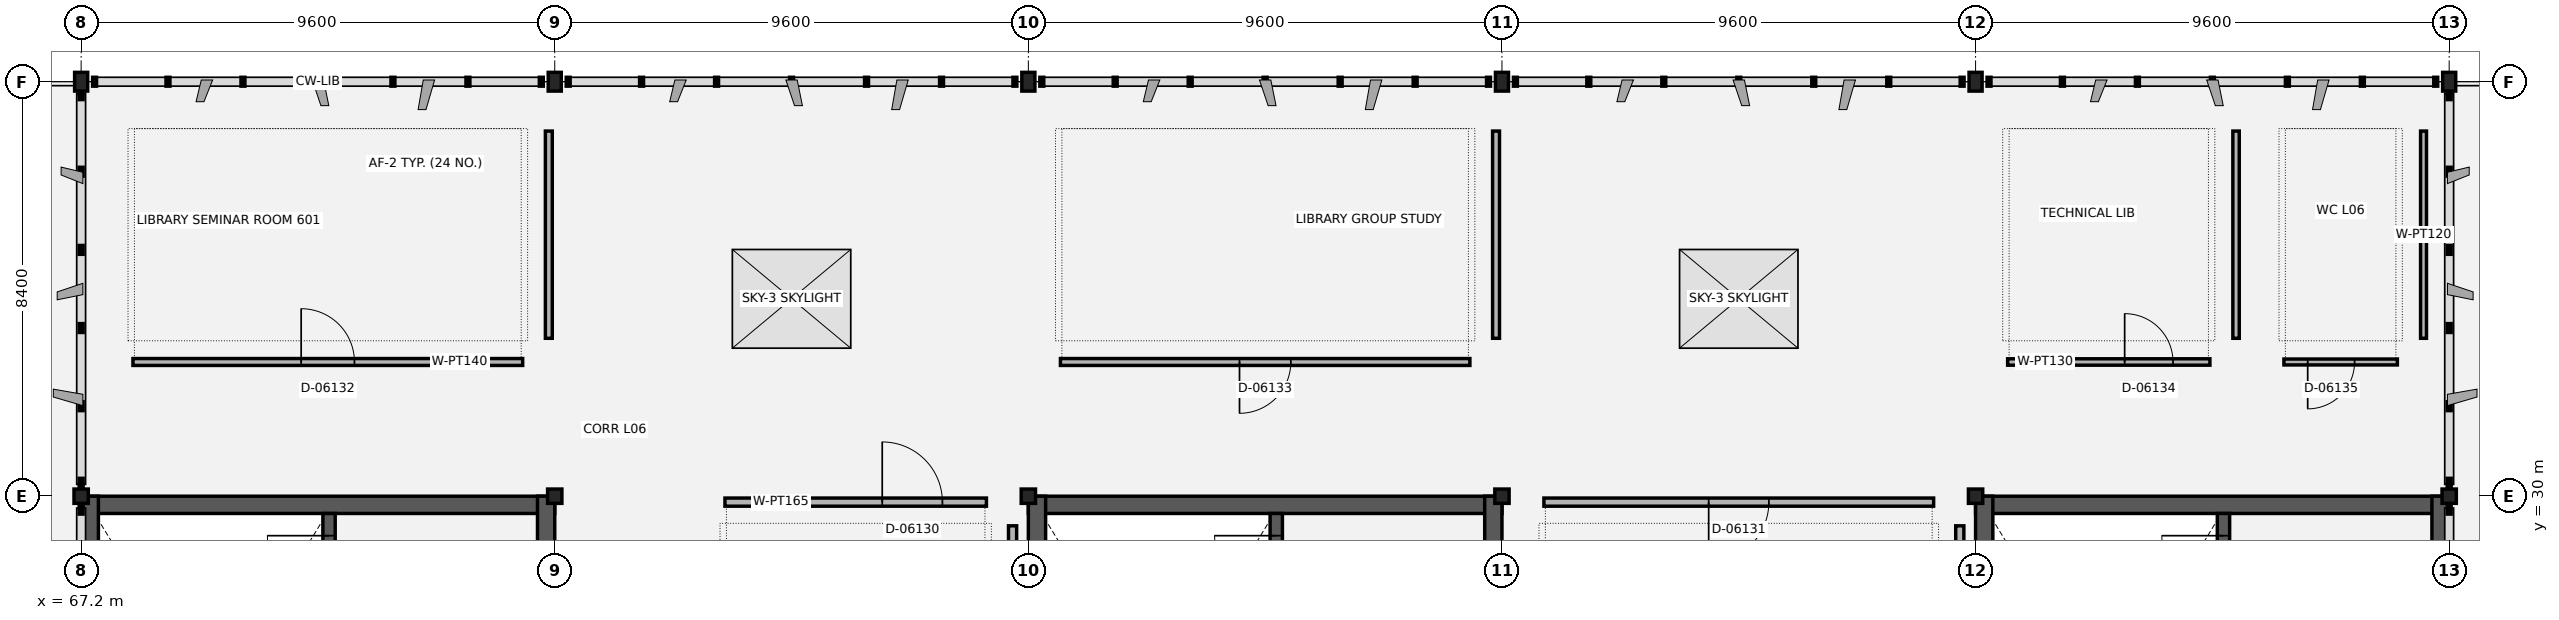
"""IFC4 building model, lengths in metres.
Left out: names, types, materials, properties, quantities, classifications, styles, units other than length and angle.
Written with IfcOpenShell. Run it as: python <this file> out.ifc"""

import sys

from ifc_helpers import new_model, si_unit, direction, frame, frame_2d, origin, origin_2d, place, context, subcontext, project, spatial, rectangle, extrude, element, fill, save


model = new_model("IFC4")
c1 = context("Model", 3, precision=1e-05, world=origin(), true_north=direction((0.0, 1.0)))
c2 = subcontext(c1, "Body", "Model", "MODEL_VIEW")
j1 = project(units=[si_unit("LENGTHUNIT", "METRE"), si_unit("PLANEANGLEUNIT", "RADIAN")], contexts=[c1])
p1 = place(None, origin())
s1 = spatial("IfcSite", under=j1, at=p1, CompositionType="ELEMENT")
p2 = place(p1, origin())
s2 = spatial("IfcBuilding", under=s1, at=p2, CompositionType="ELEMENT")
p3 = place(p2, frame((0.0, 0.0, 27.0)))
s3 = spatial("IfcBuildingStorey", under=s2, at=p3, CompositionType="ELEMENT", Elevation=27.0)
p4 = place(p3, frame((67.2, 30.0, 0.0), z_axis=(0.0, 0.0, 1.0), x_axis=(1.0, 0.0, 0.0)))
e1 = element("IfcColumn", 1, at=p4, inside=s3, PredefinedType="COLUMN", context=c2, shape_type="SweptSolid", body=[
    extrude(rectangle(XDim=0.29, YDim=0.29, at=origin_2d()), origin(), (0.0, 0.0, 1.0), 4.8),
])
p5 = place(p3, frame((67.2, 38.4, 0.0), z_axis=(0.0, 0.0, 1.0), x_axis=(1.0, 0.0, 0.0)))
e2 = element("IfcColumn", 2, at=p5, inside=s3, PredefinedType="COLUMN", context=c2, shape_type="SweptSolid", body=[
    extrude(rectangle(XDim=0.265, YDim=0.38, at=origin_2d()), origin(), (0.0, 0.0, 1.0), 4.8),
])
p6 = place(p3, frame((76.8, 30.0, 0.0), z_axis=(0.0, 0.0, 1.0), x_axis=(1.0, 0.0, 0.0)))
e3 = element("IfcColumn", 3, at=p6, inside=s3, PredefinedType="COLUMN", context=c2, shape_type="SweptSolid", body=[
    extrude(rectangle(XDim=0.29, YDim=0.29, at=origin_2d()), origin(), (0.0, 0.0, 1.0), 4.8),
])
p7 = place(p3, frame((76.8, 38.4, 0.0), z_axis=(0.0, 0.0, 1.0), x_axis=(1.0, 0.0, 0.0)))
e4 = element("IfcColumn", 4, at=p7, inside=s3, PredefinedType="COLUMN", context=c2, shape_type="SweptSolid", body=[
    extrude(rectangle(XDim=0.265, YDim=0.38, at=origin_2d()), origin(), (0.0, 0.0, 1.0), 4.8),
])
p8 = place(p3, frame((86.4, 30.0, 0.0), z_axis=(0.0, 0.0, 1.0), x_axis=(1.0, 0.0, 0.0)))
e5 = element("IfcColumn", 5, at=p8, inside=s3, PredefinedType="COLUMN", context=c2, shape_type="SweptSolid", body=[
    extrude(rectangle(XDim=0.29, YDim=0.29, at=origin_2d()), origin(), (0.0, 0.0, 1.0), 4.8),
])
p9 = place(p3, frame((86.4, 38.4, 0.0), z_axis=(0.0, 0.0, 1.0), x_axis=(1.0, 0.0, 0.0)))
e6 = element("IfcColumn", 6, at=p9, inside=s3, PredefinedType="COLUMN", context=c2, shape_type="SweptSolid", body=[
    extrude(rectangle(XDim=0.265, YDim=0.38, at=origin_2d()), origin(), (0.0, 0.0, 1.0), 4.8),
])
p10 = place(p3, frame((96.0, 30.0, 0.0), z_axis=(0.0, 0.0, 1.0), x_axis=(1.0, 0.0, 0.0)))
e7 = element("IfcColumn", 7, at=p10, inside=s3, PredefinedType="COLUMN", context=c2, shape_type="SweptSolid", body=[
    extrude(rectangle(XDim=0.29, YDim=0.29, at=origin_2d()), origin(), (0.0, 0.0, 1.0), 4.8),
])
p11 = place(p3, frame((96.0, 38.4, 0.0), z_axis=(0.0, 0.0, 1.0), x_axis=(1.0, 0.0, 0.0)))
e8 = element("IfcColumn", 8, at=p11, inside=s3, PredefinedType="COLUMN", context=c2, shape_type="SweptSolid", body=[
    extrude(rectangle(XDim=0.265, YDim=0.38, at=origin_2d()), origin(), (0.0, 0.0, 1.0), 4.8),
])
p12 = place(p3, frame((105.6, 30.0, 0.0), z_axis=(0.0, 0.0, 1.0), x_axis=(1.0, 0.0, 0.0)))
e9 = element("IfcColumn", 9, at=p12, inside=s3, PredefinedType="COLUMN", context=c2, shape_type="SweptSolid", body=[
    extrude(rectangle(XDim=0.29, YDim=0.29, at=origin_2d()), origin(), (0.0, 0.0, 1.0), 4.8),
])
p13 = place(p3, frame((105.6, 38.4, 0.0), z_axis=(0.0, 0.0, 1.0), x_axis=(1.0, 0.0, 0.0)))
e10 = element("IfcColumn", 10, at=p13, inside=s3, PredefinedType="COLUMN", context=c2, shape_type="SweptSolid", body=[
    extrude(rectangle(XDim=0.265, YDim=0.38, at=origin_2d()), origin(), (0.0, 0.0, 1.0), 4.8),
])
p14 = place(p3, frame((115.2, 30.0, 0.0), z_axis=(0.0, 0.0, 1.0), x_axis=(1.0, 0.0, 0.0)))
e11 = element("IfcColumn", 11, at=p14, inside=s3, PredefinedType="COLUMN", context=c2, shape_type="SweptSolid", body=[
    extrude(rectangle(XDim=0.29, YDim=0.29, at=origin_2d()), origin(), (0.0, 0.0, 1.0), 4.8),
])
p15 = place(p3, frame((115.2, 38.4, 0.0), z_axis=(0.0, 0.0, 1.0), x_axis=(1.0, 0.0, 0.0)))
e12 = element("IfcColumn", 12, at=p15, inside=s3, PredefinedType="COLUMN", context=c2, shape_type="SweptSolid", body=[
    extrude(rectangle(XDim=0.265, YDim=0.38, at=origin_2d()), origin(), (0.0, 0.0, 1.0), 4.8),
])
p16 = place(p3, frame((67.2, 29.825, 0.0), z_axis=(0.0, 0.0, 1.0), x_axis=(1.0, 0.0, 0.0)))
e13 = element("IfcWall", 13, at=p16, inside=s3, PredefinedType="SHEAR", context=c2, shape_type="SweptSolid", body=[
    extrude(rectangle(XDim=9.6, YDim=0.35, at=frame_2d((4.8, 0.0))), origin(), (0.0, 0.0, 1.0), 4.565),
])
p17 = place(p3, frame((67.375, 21.6, 0.0), z_axis=(0.0, 0.0, 1.0), x_axis=(0.0, 1.0, 0.0)))
e14 = element("IfcWall", 14, at=p17, inside=s3, PredefinedType="SHEAR", context=c2, shape_type="SweptSolid", body=[
    extrude(rectangle(XDim=8.4, YDim=0.35, at=frame_2d((4.2, 0.0))), origin(), (0.0, 0.0, 1.0), 4.565),
])
p18 = place(p3, frame((76.625, 21.6, 0.0), z_axis=(0.0, 0.0, 1.0), x_axis=(0.0, 1.0, 0.0)))
e15 = element("IfcWall", 15, at=p18, inside=s3, PredefinedType="SHEAR", context=c2, shape_type="SweptSolid", body=[
    extrude(rectangle(XDim=8.4, YDim=0.35, at=frame_2d((4.2, 0.0))), origin(), (0.0, 0.0, 1.0), 4.565),
])
p19 = place(p18, frame((5.3, 0.0, 0.0)))
e16 = element("IfcOpeningElement", 16, at=p19, cuts=e15, PredefinedType="OPENING", context=c2, shape_type="SweptSolid", body=[
    extrude(rectangle(XDim=1.4, YDim=2.15, at=frame_2d((0.7, 1.075))), frame((0.0, 0.185, 0.0), z_axis=(0.0, -1.0, 0.0), x_axis=(1.0, 0.0, 0.0)), (0.0, 0.0, 1.0), 0.37),
])
p20 = place(p3, frame((72.225, 29.65, 0.0), z_axis=(0.0, 0.0, 1.0), x_axis=(0.0, -1.0, 0.0)))
e17 = element("IfcWall", 17, at=p20, inside=s3, PredefinedType="SHEAR", context=c2, shape_type="SweptSolid", body=[
    extrude(rectangle(XDim=7.7, YDim=0.25, at=frame_2d((3.85, 0.0))), origin(), (0.0, 0.0, 1.0), 4.565),
])
p21 = place(p20, frame((0.45, 0.0, 0.0)))
e18 = element("IfcOpeningElement", 18, at=p21, cuts=e17, PredefinedType="OPENING", context=c2, shape_type="SweptSolid", body=[
    extrude(rectangle(XDim=1.25, YDim=2.15, at=frame_2d((0.625, 1.075))), frame((0.0, 0.135, 0.0), z_axis=(0.0, -1.0, 0.0), x_axis=(1.0, 0.0, 0.0)), (0.0, 0.0, 1.0), 0.27),
])
p22 = place(p3, frame((105.6, 29.825, 0.0), z_axis=(0.0, 0.0, 1.0), x_axis=(1.0, 0.0, 0.0)))
e19 = element("IfcWall", 19, at=p22, inside=s3, PredefinedType="SHEAR", context=c2, shape_type="SweptSolid", body=[
    extrude(rectangle(XDim=9.6, YDim=0.35, at=frame_2d((4.8, 0.0))), origin(), (0.0, 0.0, 1.0), 4.565),
])
p23 = place(p3, frame((105.775, 21.6, 0.0), z_axis=(0.0, 0.0, 1.0), x_axis=(0.0, 1.0, 0.0)))
e20 = element("IfcWall", 20, at=p23, inside=s3, PredefinedType="SHEAR", context=c2, shape_type="SweptSolid", body=[
    extrude(rectangle(XDim=8.4, YDim=0.35, at=frame_2d((4.2, 0.0))), origin(), (0.0, 0.0, 1.0), 4.565),
])
p24 = place(p3, frame((115.025, 21.6, 0.0), z_axis=(0.0, 0.0, 1.0), x_axis=(0.0, 1.0, 0.0)))
e21 = element("IfcWall", 21, at=p24, inside=s3, PredefinedType="SHEAR", context=c2, shape_type="SweptSolid", body=[
    extrude(rectangle(XDim=8.4, YDim=0.35, at=frame_2d((4.2, 0.0))), origin(), (0.0, 0.0, 1.0), 4.565),
])
p25 = place(p24, frame((5.3, 0.0, 0.0)))
e22 = element("IfcOpeningElement", 22, at=p25, cuts=e21, PredefinedType="OPENING", context=c2, shape_type="SweptSolid", body=[
    extrude(rectangle(XDim=1.4, YDim=2.15, at=frame_2d((0.7, 1.075))), frame((0.0, 0.185, 0.0), z_axis=(0.0, -1.0, 0.0), x_axis=(1.0, 0.0, 0.0)), (0.0, 0.0, 1.0), 0.37),
])
p26 = place(p3, frame((110.625, 29.65, 0.0), z_axis=(0.0, 0.0, 1.0), x_axis=(0.0, -1.0, 0.0)))
e23 = element("IfcWall", 23, at=p26, inside=s3, PredefinedType="SHEAR", context=c2, shape_type="SweptSolid", body=[
    extrude(rectangle(XDim=7.7, YDim=0.25, at=frame_2d((3.85, 0.0))), origin(), (0.0, 0.0, 1.0), 4.565),
])
p27 = place(p26, frame((0.45, 0.0, 0.0)))
e24 = element("IfcOpeningElement", 24, at=p27, cuts=e23, PredefinedType="OPENING", context=c2, shape_type="SweptSolid", body=[
    extrude(rectangle(XDim=1.25, YDim=2.15, at=frame_2d((0.625, 1.075))), frame((0.0, 0.135, 0.0), z_axis=(0.0, -1.0, 0.0), x_axis=(1.0, 0.0, 0.0)), (0.0, 0.0, 1.0), 0.27),
])
p28 = place(p3, frame((86.4, 29.825, 0.0), z_axis=(0.0, 0.0, 1.0), x_axis=(1.0, 0.0, 0.0)))
e25 = element("IfcWall", 25, at=p28, inside=s3, PredefinedType="SHEAR", context=c2, shape_type="SweptSolid", body=[
    extrude(rectangle(XDim=9.6, YDim=0.35, at=frame_2d((4.8, 0.0))), origin(), (0.0, 0.0, 1.0), 4.565),
])
p29 = place(p3, frame((86.575, 21.6, 0.0), z_axis=(0.0, 0.0, 1.0), x_axis=(0.0, 1.0, 0.0)))
e26 = element("IfcWall", 26, at=p29, inside=s3, PredefinedType="SHEAR", context=c2, shape_type="SweptSolid", body=[
    extrude(rectangle(XDim=8.4, YDim=0.35, at=frame_2d((4.2, 0.0))), origin(), (0.0, 0.0, 1.0), 4.565),
])
p30 = place(p3, frame((95.825, 21.6, 0.0), z_axis=(0.0, 0.0, 1.0), x_axis=(0.0, 1.0, 0.0)))
e27 = element("IfcWall", 27, at=p30, inside=s3, PredefinedType="SHEAR", context=c2, shape_type="SweptSolid", body=[
    extrude(rectangle(XDim=8.4, YDim=0.35, at=frame_2d((4.2, 0.0))), origin(), (0.0, 0.0, 1.0), 4.565),
])
p31 = place(p30, frame((5.3, 0.0, 0.0)))
e28 = element("IfcOpeningElement", 28, at=p31, cuts=e27, PredefinedType="OPENING", context=c2, shape_type="SweptSolid", body=[
    extrude(rectangle(XDim=1.4, YDim=2.15, at=frame_2d((0.7, 1.075))), frame((0.0, 0.185, 0.0), z_axis=(0.0, -1.0, 0.0), x_axis=(1.0, 0.0, 0.0)), (0.0, 0.0, 1.0), 0.37),
])
p32 = place(p3, frame((91.425, 29.65, 0.0), z_axis=(0.0, 0.0, 1.0), x_axis=(0.0, -1.0, 0.0)))
e29 = element("IfcWall", 29, at=p32, inside=s3, PredefinedType="SHEAR", context=c2, shape_type="SweptSolid", body=[
    extrude(rectangle(XDim=7.7, YDim=0.25, at=frame_2d((3.85, 0.0))), origin(), (0.0, 0.0, 1.0), 4.565),
])
p33 = place(p32, frame((0.45, 0.0, 0.0)))
e30 = element("IfcOpeningElement", 30, at=p33, cuts=e29, PredefinedType="OPENING", context=c2, shape_type="SweptSolid", body=[
    extrude(rectangle(XDim=1.25, YDim=2.15, at=frame_2d((0.625, 1.075))), frame((0.0, 0.135, 0.0), z_axis=(0.0, -1.0, 0.0), x_axis=(1.0, 0.0, 0.0)), (0.0, 0.0, 1.0), 0.27),
])
p34 = place(p3, frame((80.25, 29.88, 0.0), z_axis=(0.0, 0.0, 1.0), x_axis=(1.0, 0.0, 0.0)))
e31 = element("IfcWall", 31, at=p34, inside=s3, PredefinedType="PARTITIONING", context=c2, shape_type="SweptSolid", body=[
    extrude(rectangle(XDim=5.3, YDim=0.165, at=frame_2d((2.65, 0.0))), origin(), (0.0, 0.0, 1.0), 3.945),
])
p35 = place(p34, frame((3.188, 0.0, 0.0)))
e32 = element("IfcOpeningElement", 32, at=p35, cuts=e31, PredefinedType="OPENING", context=c2, shape_type="SweptSolid", body=[
    extrude(rectangle(XDim=1.22, YDim=2.15, at=frame_2d((0.61, 1.075))), frame((0.0, 0.093, 0.0), z_axis=(0.0, -1.0, 0.0), x_axis=(1.0, 0.0, 0.0)), (0.0, 0.0, 1.0), 0.185),
])
p36 = place(p3, frame((86.08, 22.4, 0.0), z_axis=(0.0, 0.0, 1.0), x_axis=(0.0, 1.0, 0.0)))
e33 = element("IfcWall", 33, at=p36, inside=s3, PredefinedType="PARTITIONING", context=c2, shape_type="SweptSolid", body=[
    extrude(rectangle(XDim=7.0, YDim=0.165, at=frame_2d((3.5, 0.0))), origin(), (0.0, 0.0, 1.0), 3.945),
])
p37 = place(p3, frame((96.85, 29.88, 0.0), z_axis=(0.0, 0.0, 1.0), x_axis=(1.0, 0.0, 0.0)))
e34 = element("IfcWall", 34, at=p37, inside=s3, PredefinedType="PARTITIONING", context=c2, shape_type="SweptSolid", body=[
    extrude(rectangle(XDim=7.9, YDim=0.165, at=frame_2d((3.95, 0.0))), origin(), (0.0, 0.0, 1.0), 3.945),
])
p38 = place(p37, frame((3.34, 0.0, 0.0)))
e35 = element("IfcOpeningElement", 35, at=p38, cuts=e34, PredefinedType="OPENING", context=c2, shape_type="SweptSolid", body=[
    extrude(rectangle(XDim=1.22, YDim=2.15, at=frame_2d((0.61, 1.075))), frame((0.0, 0.093, 0.0), z_axis=(0.0, -1.0, 0.0), x_axis=(1.0, 0.0, 0.0)), (0.0, 0.0, 1.0), 0.185),
])
p39 = place(p3, frame((105.28, 22.4, 0.0), z_axis=(0.0, 0.0, 1.0), x_axis=(0.0, 1.0, 0.0)))
e36 = element("IfcWall", 36, at=p39, inside=s3, PredefinedType="PARTITIONING", context=c2, shape_type="SweptSolid", body=[
    extrude(rectangle(XDim=7.0, YDim=0.165, at=frame_2d((3.5, 0.0))), origin(), (0.0, 0.0, 1.0), 3.945),
])
p40 = place(p3, frame((68.25, 32.72, 0.0), z_axis=(0.0, 0.0, 1.0), x_axis=(1.0, 0.0, 0.0)))
e37 = element("IfcWall", 37, at=p40, inside=s3, PredefinedType="PARTITIONING", context=c2, shape_type="SweptSolid", body=[
    extrude(rectangle(XDim=7.9, YDim=0.14, at=frame_2d((3.95, 0.0))), origin(), (0.0, 0.0, 1.0), 3.945),
])
p41 = place(p40, frame((3.41, 0.0, 0.0)))
e38 = element("IfcOpeningElement", 38, at=p41, cuts=e37, PredefinedType="OPENING", context=c2, shape_type="SweptSolid", body=[
    extrude(rectangle(XDim=1.08, YDim=2.15, at=frame_2d((0.54, 1.075))), frame((0.0, 0.08, 0.0), z_axis=(0.0, -1.0, 0.0), x_axis=(1.0, 0.0, 0.0)), (0.0, 0.0, 1.0), 0.16),
])
p42 = place(p3, frame((76.68, 33.2, 0.0), z_axis=(0.0, 0.0, 1.0), x_axis=(0.0, 1.0, 0.0)))
e39 = element("IfcWall", 39, at=p42, inside=s3, PredefinedType="PARTITIONING", context=c2, shape_type="SweptSolid", body=[
    extrude(rectangle(XDim=4.2, YDim=0.14, at=frame_2d((2.1, 0.0))), origin(), (0.0, 0.0, 1.0), 3.945),
])
p43 = place(p3, frame((87.05, 32.72, 0.0), z_axis=(0.0, 0.0, 1.0), x_axis=(1.0, 0.0, 0.0)))
e40 = element("IfcWall", 40, at=p43, inside=s3, PredefinedType="PARTITIONING", context=c2, shape_type="SweptSolid", body=[
    extrude(rectangle(XDim=8.3, YDim=0.14, at=frame_2d((4.15, 0.0))), origin(), (0.0, 0.0, 1.0), 3.945),
])
p44 = place(p43, frame((3.63, 0.0, 0.0)))
e41 = element("IfcOpeningElement", 41, at=p44, cuts=e40, PredefinedType="OPENING", context=c2, shape_type="SweptSolid", body=[
    extrude(rectangle(XDim=1.04, YDim=2.15, at=frame_2d((0.52, 1.075))), frame((0.0, 0.08, 0.0), z_axis=(0.0, -1.0, 0.0), x_axis=(1.0, 0.0, 0.0)), (0.0, 0.0, 1.0), 0.16),
])
p45 = place(p3, frame((95.88, 33.2, 0.0), z_axis=(0.0, 0.0, 1.0), x_axis=(0.0, 1.0, 0.0)))
e42 = element("IfcWall", 42, at=p45, inside=s3, PredefinedType="PARTITIONING", context=c2, shape_type="SweptSolid", body=[
    extrude(rectangle(XDim=4.2, YDim=0.14, at=frame_2d((2.1, 0.0))), origin(), (0.0, 0.0, 1.0), 3.945),
])
p46 = place(p3, frame((106.25, 32.72, 0.0), z_axis=(0.0, 0.0, 1.0), x_axis=(1.0, 0.0, 0.0)))
e43 = element("IfcWall", 43, at=p46, inside=s3, PredefinedType="PARTITIONING", context=c2, shape_type="SweptSolid", body=[
    extrude(rectangle(XDim=4.1, YDim=0.13, at=frame_2d((2.05, 0.0))), origin(), (0.0, 0.0, 1.0), 3.945),
])
p47 = place(p46, frame((2.372, 0.0, 0.0)))
e44 = element("IfcOpeningElement", 44, at=p47, cuts=e43, PredefinedType="OPENING", context=c2, shape_type="SweptSolid", body=[
    extrude(rectangle(XDim=0.98, YDim=2.1, at=frame_2d((0.49, 1.05))), frame((0.0, 0.075, 0.0), z_axis=(0.0, -1.0, 0.0), x_axis=(1.0, 0.0, 0.0)), (0.0, 0.0, 1.0), 0.15),
])
p48 = place(p3, frame((110.88, 33.2, 0.0), z_axis=(0.0, 0.0, 1.0), x_axis=(0.0, 1.0, 0.0)))
e45 = element("IfcWall", 45, at=p48, inside=s3, PredefinedType="PARTITIONING", context=c2, shape_type="SweptSolid", body=[
    extrude(rectangle(XDim=4.2, YDim=0.13, at=frame_2d((2.1, 0.0))), origin(), (0.0, 0.0, 1.0), 3.945),
])
p49 = place(p3, frame((111.85, 32.72, 0.0), z_axis=(0.0, 0.0, 1.0), x_axis=(1.0, 0.0, 0.0)))
e46 = element("IfcWall", 46, at=p49, inside=s3, PredefinedType="PARTITIONING", context=c2, shape_type="SweptSolid", body=[
    extrude(rectangle(XDim=2.3, YDim=0.12, at=frame_2d((1.15, 0.0))), origin(), (0.0, 0.0, 1.0), 3.945),
])
p50 = place(p49, frame((0.482, 0.0, 0.0)))
e47 = element("IfcOpeningElement", 47, at=p50, cuts=e46, PredefinedType="OPENING", context=c2, shape_type="SweptSolid", body=[
    extrude(rectangle(XDim=0.95, YDim=2.1, at=frame_2d((0.475, 1.05))), frame((0.0, 0.07, 0.0), z_axis=(0.0, -1.0, 0.0), x_axis=(1.0, 0.0, 0.0)), (0.0, 0.0, 1.0), 0.14),
])
p51 = place(p3, frame((114.68, 33.2, 0.0), z_axis=(0.0, 0.0, 1.0), x_axis=(0.0, 1.0, 0.0)))
e48 = element("IfcWall", 48, at=p51, inside=s3, PredefinedType="PARTITIONING", context=c2, shape_type="SweptSolid", body=[
    extrude(rectangle(XDim=4.2, YDim=0.12, at=frame_2d((2.1, 0.0))), origin(), (0.0, 0.0, 1.0), 3.945),
])
p52 = place(p2, frame((0.0, 0.0, 31.8)))
p53 = place(p52, frame((0.0, 0.0, -0.235)))
p54 = place(p53, frame((81.6, 34.0, 0.0)))
p55 = place(p54, frame((0.0, 0.0, 0.185)))
e49 = element("IfcWindow", 49, at=p55, inside=s3, PartitioningType="SINGLE_PANEL", PredefinedType="SKYLIGHT", context=c2, shape_type="SweptSolid", body=[
    extrude(rectangle(XDim=2.4, YDim=2.0, at=origin_2d()), origin(), (0.0, 0.0, 1.0), 0.05),
])
p56 = place(p53, frame((100.8, 34.0, 0.0)))
p57 = place(p56, frame((0.0, 0.0, 0.185)))
e50 = element("IfcWindow", 50, at=p57, inside=s3, PartitioningType="SINGLE_PANEL", PredefinedType="SKYLIGHT", context=c2, shape_type="SweptSolid", body=[
    extrude(rectangle(XDim=2.4, YDim=2.0, at=origin_2d()), origin(), (0.0, 0.0, 1.0), 0.05),
])
p58 = place(p21, origin())
e51 = element("IfcDoor", 51, at=p58, inside=s3, OperationType="SINGLE_SWING_RIGHT", PredefinedType="DOOR", context=c2, shape_type="SweptSolid", body=[
    extrude(rectangle(XDim=1.25, YDim=2.15, at=frame_2d((0.625, 1.075))), frame((0.0, 0.025, 0.0), z_axis=(0.0, -1.0, 0.0), x_axis=(1.0, 0.0, 0.0)), (0.0, 0.0, 1.0), 0.05),
])
fill(e18, e51)
p59 = place(p27, origin())
e52 = element("IfcDoor", 52, at=p59, inside=s3, OperationType="SINGLE_SWING_RIGHT", PredefinedType="DOOR", context=c2, shape_type="SweptSolid", body=[
    extrude(rectangle(XDim=1.25, YDim=2.15, at=frame_2d((0.625, 1.075))), frame((0.0, 0.025, 0.0), z_axis=(0.0, -1.0, 0.0), x_axis=(1.0, 0.0, 0.0)), (0.0, 0.0, 1.0), 0.05),
])
fill(e24, e52)
p60 = place(p33, origin())
e53 = element("IfcDoor", 53, at=p60, inside=s3, OperationType="SINGLE_SWING_RIGHT", PredefinedType="DOOR", context=c2, shape_type="SweptSolid", body=[
    extrude(rectangle(XDim=1.25, YDim=2.15, at=frame_2d((0.625, 1.075))), frame((0.0, 0.025, 0.0), z_axis=(0.0, -1.0, 0.0), x_axis=(1.0, 0.0, 0.0)), (0.0, 0.0, 1.0), 0.05),
])
fill(e30, e53)
p61 = place(p35, origin())
e54 = element("IfcDoor", 54, at=p61, inside=s3, OperationType="SINGLE_SWING_LEFT", PredefinedType="DOOR", context=c2, shape_type="SweptSolid", body=[
    extrude(rectangle(XDim=1.22, YDim=2.15, at=frame_2d((0.61, 1.075))), frame((0.0, 0.025, 0.0), z_axis=(0.0, -1.0, 0.0), x_axis=(1.0, 0.0, 0.0)), (0.0, 0.0, 1.0), 0.05),
])
fill(e32, e54)
p62 = place(p38, origin())
e55 = element("IfcDoor", 55, at=p62, inside=s3, OperationType="SINGLE_SWING_RIGHT", PredefinedType="DOOR", context=c2, shape_type="SweptSolid", body=[
    extrude(rectangle(XDim=1.22, YDim=2.15, at=frame_2d((0.61, 1.075))), frame((0.0, 0.025, 0.0), z_axis=(0.0, -1.0, 0.0), x_axis=(1.0, 0.0, 0.0)), (0.0, 0.0, 1.0), 0.05),
])
fill(e35, e55)
p63 = place(p41, origin())
e56 = element("IfcDoor", 56, at=p63, inside=s3, OperationType="SINGLE_SWING_LEFT", PredefinedType="DOOR", context=c2, shape_type="SweptSolid", body=[
    extrude(rectangle(XDim=1.08, YDim=2.15, at=frame_2d((0.54, 1.075))), frame((0.0, 0.025, 0.0), z_axis=(0.0, -1.0, 0.0), x_axis=(1.0, 0.0, 0.0)), (0.0, 0.0, 1.0), 0.05),
])
fill(e38, e56)
p64 = place(p44, origin())
e57 = element("IfcDoor", 57, at=p64, inside=s3, OperationType="SINGLE_SWING_RIGHT", PredefinedType="DOOR", context=c2, shape_type="SweptSolid", body=[
    extrude(rectangle(XDim=1.04, YDim=2.15, at=frame_2d((0.52, 1.075))), frame((0.0, 0.025, 0.0), z_axis=(0.0, -1.0, 0.0), x_axis=(1.0, 0.0, 0.0)), (0.0, 0.0, 1.0), 0.05),
])
fill(e41, e57)
p65 = place(p47, origin())
e58 = element("IfcDoor", 58, at=p65, inside=s3, OperationType="SINGLE_SWING_LEFT", PredefinedType="DOOR", context=c2, shape_type="SweptSolid", body=[
    extrude(rectangle(XDim=0.98, YDim=2.1, at=frame_2d((0.49, 1.05))), frame((0.0, 0.025, 0.0), z_axis=(0.0, -1.0, 0.0), x_axis=(1.0, 0.0, 0.0)), (0.0, 0.0, 1.0), 0.05),
])
fill(e44, e58)
p66 = place(p50, origin())
e59 = element("IfcDoor", 59, at=p66, inside=s3, OperationType="SINGLE_SWING_RIGHT", PredefinedType="DOOR", context=c2, shape_type="SweptSolid", body=[
    extrude(rectangle(XDim=0.95, YDim=2.1, at=frame_2d((0.475, 1.05))), frame((0.0, 0.025, 0.0), z_axis=(0.0, -1.0, 0.0), x_axis=(1.0, 0.0, 0.0)), (0.0, 0.0, 1.0), 0.05),
])
fill(e47, e59)
save(model, sys.argv[1])
